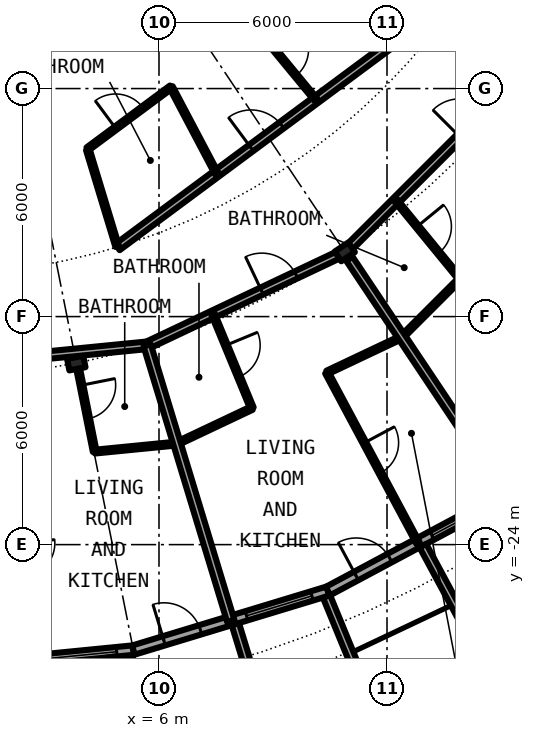
"""IFC4 building model, lengths in metres.
Left out: names, types, materials, properties, quantities, classifications, styles, units other than length and angle.
Written with IfcOpenShell. Run it as: python <this file> out.ifc"""

import sys

from ifc_helpers import new_model, si_unit, direction, frame, frame_2d, origin, origin_2d, place, context, subcontext, project, spatial, rectangle, i_section, extrude, element, fill, save


model = new_model("IFC4")
c1 = context("Model", 3, precision=1e-05, world=origin(), true_north=direction((0.0, 1.0)))
c2 = subcontext(c1, "Body", "Model", "MODEL_VIEW")
j1 = project(units=[si_unit("LENGTHUNIT", "METRE"), si_unit("PLANEANGLEUNIT", "RADIAN")], contexts=[c1])
p1 = place(None, origin())
s1 = spatial("IfcSite", under=j1, at=p1, CompositionType="ELEMENT")
p2 = place(p1, origin())
s2 = spatial("IfcBuilding", under=s1, at=p2, CompositionType="ELEMENT")
p3 = place(p2, frame((0.0, 0.0, 120.8)))
s3 = spatial("IfcBuildingStorey", under=s2, at=p3, CompositionType="ELEMENT", Elevation=120.8)
for number, where, z_axis, x_axis in (
    (1, (3.824, -19.223, 0.0), (0.0, 0.0, 1.0), (0.195, -0.981, 0.0)),
    (2, (10.889, -16.297, 0.0), (0.0, 0.0, 1.0), (0.556, -0.831, 0.0)),
):
    element("IfcColumn", number, at=place(p3, frame(where, z_axis=z_axis, x_axis=x_axis)), inside=s3, PredefinedType="COLUMN", context=c2, shape_type="SweptSolid", body=[
        extrude(i_section(OverallWidth=0.307, OverallDepth=0.432, WebThickness=0.021, FlangeThickness=0.04, FilletRadius=0.027, at=origin_2d()), origin(), (0.0, 0.0, 1.0), 3.05),
    ])
p4 = place(p3, frame((0.0, -27.3, 0.0), z_axis=(0.0, 0.0, 1.0), x_axis=(0.995173996315, 0.098126026407, 0.0)))
e3 = element("IfcWall", 3, at=p4, inside=s3, PredefinedType="SOLIDWALL", context=c2, shape_type="SweptSolid", body=[
    extrude(rectangle(XDim=5.352, YDim=0.25, at=frame_2d((2.676, 0.0))), origin(), (0.0, 0.0, 1.0), 2.7),
])
p5 = place(p4, frame((0.841, 0.0, 0.0)))
e4 = element("IfcOpeningElement", 4, at=p5, cuts=e3, PredefinedType="OPENING", context=c2, shape_type="SweptSolid", body=[
    extrude(rectangle(XDim=1.0, YDim=2.2, at=frame_2d((0.5, 1.1))), frame((0.0, 0.135, 0.0), z_axis=(0.0, -1.0, 0.0), x_axis=(1.0, 0.0, 0.0)), (0.0, 0.0, 1.0), 0.27),
])
p6 = place(p4, frame((3.111, 0.0, 0.3)))
e5 = element("IfcOpeningElement", 5, at=p6, cuts=e3, PredefinedType="OPENING", context=c2, shape_type="SweptSolid", body=[
    extrude(rectangle(XDim=1.8, YDim=2.1, at=frame_2d((0.9, 1.05))), frame((0.0, 0.135, 0.0), z_axis=(0.0, -1.0, 0.0), x_axis=(1.0, 0.0, 0.0)), (0.0, 0.0, 1.0), 0.27),
])
p7 = place(p3, frame((4.72, -26.961, -0.03), z_axis=(0.0, 0.0, 1.0), x_axis=(0.172463232037, -0.98501595601, 0.0)))
e6 = element("IfcWall", 6, at=p7, inside=s3, PredefinedType="SOLIDWALL", context=c2, shape_type="SweptSolid", body=[
    extrude(rectangle(XDim=2.929, YDim=0.2, at=frame_2d((1.464, 0.0))), origin(), (0.0, 0.0, 1.0), 2.73),
])
p8 = place(p3, frame((5.326, -26.775, 0.0), z_axis=(0.0, 0.0, 1.0), x_axis=(0.956965678721, 0.290201119486, 0.0)))
e7 = element("IfcWall", 7, at=p8, inside=s3, PredefinedType="SOLIDWALL", context=c2, shape_type="SweptSolid", body=[
    extrude(rectangle(XDim=5.351, YDim=0.25, at=frame_2d((2.676, 0.0))), origin(), (0.0, 0.0, 1.0), 2.7),
])
p9 = place(p8, frame((0.841, 0.0, 0.0)))
e8 = element("IfcOpeningElement", 8, at=p9, cuts=e7, PredefinedType="OPENING", context=c2, shape_type="SweptSolid", body=[
    extrude(rectangle(XDim=1.0, YDim=2.2, at=frame_2d((0.5, 1.1))), frame((0.0, 0.135, 0.0), z_axis=(0.0, -1.0, 0.0), x_axis=(1.0, 0.0, 0.0)), (0.0, 0.0, 1.0), 0.27),
])
p10 = place(p8, frame((3.111, 0.0, 0.3)))
e9 = element("IfcOpeningElement", 9, at=p10, cuts=e7, PredefinedType="OPENING", context=c2, shape_type="SweptSolid", body=[
    extrude(rectangle(XDim=1.8, YDim=2.1, at=frame_2d((0.9, 1.05))), frame((0.0, 0.135, 0.0), z_axis=(0.0, -1.0, 0.0), x_axis=(1.0, 0.0, 0.0)), (0.0, 0.0, 1.0), 0.27),
])
p11 = place(p3, frame((8.009, -26.092, -0.03), z_axis=(0.0, 0.0, 1.0), x_axis=(0.293406695073, -0.955987715029, 0.0)))
e10 = element("IfcWall", 10, at=p11, inside=s3, PredefinedType="SOLIDWALL", context=c2, shape_type="SweptSolid", body=[
    extrude(rectangle(XDim=3.006, YDim=0.2, at=frame_2d((1.503, 0.0))), origin(), (0.0, 0.0, 1.0), 2.73),
])
p12 = place(p3, frame((10.409, -25.364, -0.03), z_axis=(0.0, 0.0, 1.0), x_axis=(0.379509886562, -0.925187681501, 0.0)))
e11 = element("IfcWall", 11, at=p12, inside=s3, PredefinedType="SOLIDWALL", context=c2, shape_type="SweptSolid", body=[
    extrude(rectangle(XDim=2.883, YDim=0.2, at=frame_2d((1.441, 0.0))), origin(), (0.0, 0.0, 1.0), 2.73),
])
p13 = place(p3, frame((10.447, -25.222, 0.0), z_axis=(0.0, 0.0, 1.0), x_axis=(0.881915646801, 0.471407246368, 0.0)))
e12 = element("IfcWall", 12, at=p13, inside=s3, PredefinedType="SOLIDWALL", context=c2, shape_type="SweptSolid", body=[
    extrude(rectangle(XDim=5.352, YDim=0.25, at=frame_2d((2.676, 0.0))), origin(), (0.0, 0.0, 1.0), 2.7),
])
p14 = place(p13, frame((0.841, 0.0, 0.0)))
e13 = element("IfcOpeningElement", 13, at=p14, cuts=e12, PredefinedType="OPENING", context=c2, shape_type="SweptSolid", body=[
    extrude(rectangle(XDim=1.0, YDim=2.2, at=frame_2d((0.5, 1.1))), frame((0.0, 0.135, 0.0), z_axis=(0.0, -1.0, 0.0), x_axis=(1.0, 0.0, 0.0)), (0.0, 0.0, 1.0), 0.27),
])
p15 = place(p13, frame((3.111, 0.0, 0.3)))
e14 = element("IfcOpeningElement", 14, at=p15, cuts=e12, PredefinedType="OPENING", context=c2, shape_type="SweptSolid", body=[
    extrude(rectangle(XDim=1.8, YDim=2.1, at=frame_2d((0.9, 1.05))), frame((0.0, 0.135, 0.0), z_axis=(0.0, -1.0, 0.0), x_axis=(1.0, 0.0, 0.0)), (0.0, 0.0, 1.0), 0.27),
])
p16 = place(p3, frame((12.945, -24.029, -0.03), z_axis=(0.0, 0.0, 1.0), x_axis=(0.474424310775, -0.88029629861, 0.0)))
e15 = element("IfcWall", 15, at=p16, inside=s3, PredefinedType="SOLIDWALL", context=c2, shape_type="SweptSolid", body=[
    extrude(rectangle(XDim=3.006, YDim=0.2, at=frame_2d((1.503, 0.0))), origin(), (0.0, 0.0, 1.0), 2.73),
])
p17 = place(p3, frame((6.473, -21.34, 0.0), z_axis=(0.0, 0.0, 1.0), x_axis=(0.903929143338, 0.427682246328, 0.0)))
e16 = element("IfcWall", 16, at=p17, inside=s3, PredefinedType="PARTITIONING", context=c2, shape_type="SweptSolid", body=[
    extrude(rectangle(XDim=2.182, YDim=0.1, at=frame_2d((1.091, 0.0))), origin(), (0.0, 0.0, 1.0), 2.7),
])
p18 = place(p3, frame((10.425, -19.47, 0.0), z_axis=(0.0, 0.0, 1.0), x_axis=(0.903951937529, 0.427634066274, 0.0)))
e17 = element("IfcWall", 17, at=p18, inside=s3, PredefinedType="PARTITIONING", context=c2, shape_type="SweptSolid", body=[
    extrude(rectangle(XDim=2.181, YDim=0.1, at=frame_2d((1.091, 0.0))), origin(), (0.0, 0.0, 1.0), 2.7),
])
p19 = place(p3, frame((4.311, -21.553, 0.0), z_axis=(0.0, 0.0, 1.0), x_axis=(0.995195976339, 0.097902853268, 0.0)))
e18 = element("IfcWall", 18, at=p19, inside=s3, PredefinedType="PARTITIONING", context=c2, shape_type="SweptSolid", body=[
    extrude(rectangle(XDim=2.175, YDim=0.1, at=frame_2d((1.087, 0.0))), origin(), (0.0, 0.0, 1.0), 2.7),
])
p20 = place(p3, frame((12.389, -18.542, 0.0), z_axis=(0.0, 0.0, 1.0), x_axis=(0.707106781187, 0.707106781187, 0.0)))
e19 = element("IfcWall", 19, at=p20, inside=s3, PredefinedType="PARTITIONING", context=c2, shape_type="SweptSolid", body=[
    extrude(rectangle(XDim=2.175, YDim=0.1, at=frame_2d((1.088, 0.0))), origin(), (0.0, 0.0, 1.0), 2.7),
])
p21 = place(p3, frame((5.686, -18.758, 0.0), z_axis=(0.0, 0.0, 1.0), x_axis=(0.903961383505, 0.427614098379, 0.0)))
e20 = element("IfcWall", 20, at=p21, inside=s3, PredefinedType="PARTITIONING", context=c2, shape_type="SweptSolid", body=[
    extrude(rectangle(XDim=5.601, YDim=0.2, at=frame_2d((2.8, 0.0))), origin(), (0.0, 0.0, 1.0), 2.39),
])
p22 = place(p21, frame((3.339, 0.0, 0.0)))
e21 = element("IfcOpeningElement", 21, at=p22, cuts=e20, PredefinedType="OPENING", context=c2, shape_type="SweptSolid", body=[
    extrude(rectangle(XDim=1.0, YDim=2.3, at=frame_2d((0.5, 1.15))), frame((0.0, 0.11, 0.0), z_axis=(0.0, -1.0, 0.0), x_axis=(1.0, 0.0, 0.0)), (0.0, 0.0, 1.0), 0.22),
])
p23 = place(p3, frame((-1.921, -19.506, 0.0), z_axis=(0.0, 0.0, 1.0), x_axis=(0.995172982325, 0.098136309541, 0.0)))
e22 = element("IfcWall", 22, at=p23, inside=s3, PredefinedType="PARTITIONING", context=c2, shape_type="SweptSolid", body=[
    extrude(rectangle(XDim=7.655, YDim=0.2, at=frame_2d((3.827, 0.0))), origin(), (0.0, 0.0, 1.0), 2.39),
])
p24 = place(p23, frame((2.368, 0.0, 0.0)))
e23 = element("IfcOpeningElement", 23, at=p24, cuts=e22, PredefinedType="OPENING", context=c2, shape_type="SweptSolid", body=[
    extrude(rectangle(XDim=1.0, YDim=2.3, at=frame_2d((0.5, 1.15))), frame((0.0, 0.11, 0.0), z_axis=(0.0, -1.0, 0.0), x_axis=(1.0, 0.0, 0.0)), (0.0, 0.0, 1.0), 0.22),
])
p25 = place(p3, frame((11.0, -16.186, 0.0), z_axis=(0.0, 0.0, 1.0), x_axis=(0.707106781187, 0.707106781187, 0.0)))
e24 = element("IfcWall", 24, at=p25, inside=s3, PredefinedType="PARTITIONING", context=c2, shape_type="SweptSolid", body=[
    extrude(rectangle(XDim=7.334, YDim=0.2, at=frame_2d((3.667, 0.0))), origin(), (0.0, 0.0, 1.0), 2.39),
])
p26 = place(p25, frame((4.123, 0.0, 0.0)))
e25 = element("IfcOpeningElement", 25, at=p26, cuts=e24, PredefinedType="OPENING", context=c2, shape_type="SweptSolid", body=[
    extrude(rectangle(XDim=1.0, YDim=2.3, at=frame_2d((0.5, 1.15))), frame((0.0, 0.11, 0.0), z_axis=(0.0, -1.0, 0.0), x_axis=(1.0, 0.0, 0.0)), (0.0, 0.0, 1.0), 0.22),
])
p27 = place(p3, frame((4.906, -16.172, 0.0), z_axis=(0.0, 0.0, 1.0), x_axis=(0.803204584823, 0.59570327758, 0.0)))
e26 = element("IfcWall", 26, at=p27, inside=s3, PredefinedType="PARTITIONING", context=c2, shape_type="SweptSolid", body=[
    extrude(rectangle(XDim=11.387, YDim=0.2, at=frame_2d((5.693, 0.0))), origin(), (0.0, 0.0, 1.0), 2.7),
])
p28 = place(p27, frame((4.38, 0.0, 0.0)))
e27 = element("IfcOpeningElement", 27, at=p28, cuts=e26, PredefinedType="OPENING", context=c2, shape_type="SweptSolid", body=[
    extrude(rectangle(XDim=1.0, YDim=2.3, at=frame_2d((0.5, 1.15))), frame((0.0, 0.11, 0.0), z_axis=(0.0, -1.0, 0.0), x_axis=(1.0, 0.0, 0.0)), (0.0, 0.0, 1.0), 0.22),
])
p29 = place(p3, frame((4.122, -13.589, 0.0), z_axis=(0.0, 0.0, 1.0), x_axis=(0.803128348509, 0.595806055542, 0.0)))
e28 = element("IfcWall", 28, at=p29, inside=s3, PredefinedType="PARTITIONING", context=c2, shape_type="SweptSolid", body=[
    extrude(rectangle(XDim=2.734, YDim=0.1, at=frame_2d((1.367, 0.0))), origin(), (0.0, 0.0, 1.0), 2.7),
])
p30 = place(p29, frame((0.917, 0.0, 0.0)))
e29 = element("IfcOpeningElement", 29, at=p30, cuts=e28, PredefinedType="OPENING", context=c2, shape_type="SweptSolid", body=[
    extrude(rectangle(XDim=0.9, YDim=2.3, at=frame_2d((0.45, 1.15))), frame((0.0, 0.06, 0.0), z_axis=(0.0, -1.0, 0.0), x_axis=(1.0, 0.0, 0.0)), (0.0, 0.0, 1.0), 0.12),
])
p31 = place(p3, frame((3.885, -19.432, 0.0), z_axis=(0.0, 0.0, 1.0), x_axis=(0.196051018784, -0.980593696713, 0.0)))
e30 = element("IfcWall", 30, at=p31, inside=s3, PredefinedType="PARTITIONING", context=c2, shape_type="SweptSolid", body=[
    extrude(rectangle(XDim=2.163, YDim=0.1, at=frame_2d((1.082, 0.0))), origin(), (0.0, 0.0, 1.0), 2.7),
])
p32 = place(p31, frame((0.382, 0.0, 0.0)))
e31 = element("IfcOpeningElement", 31, at=p32, cuts=e30, PredefinedType="OPENING", context=c2, shape_type="SweptSolid", body=[
    extrude(rectangle(XDim=0.9, YDim=2.3, at=frame_2d((0.45, 1.15))), frame((0.0, 0.06, 0.0), z_axis=(0.0, -1.0, 0.0), x_axis=(1.0, 0.0, 0.0)), (0.0, 0.0, 1.0), 0.12),
])
p33 = place(p3, frame((4.908, -5.959, 0.0), z_axis=(0.0, 0.0, 1.0), x_axis=(0.636105207978, -0.771602335652, 0.0)))
e32 = element("IfcWall", 32, at=p33, inside=s3, PredefinedType="PARTITIONING", context=c2, shape_type="SweptSolid", body=[
    extrude(rectangle(XDim=8.213, YDim=0.1, at=frame_2d((4.106, 0.0))), origin(), (0.0, 0.0, 1.0), 2.7),
])
p34 = place(p33, frame((6.49, 0.0, 0.0)))
e33 = element("IfcOpeningElement", 33, at=p34, cuts=e32, PredefinedType="OPENING", context=c2, shape_type="SweptSolid", body=[
    extrude(rectangle(XDim=0.9, YDim=2.3, at=frame_2d((0.45, 1.15))), frame((0.0, 0.06, 0.0), z_axis=(0.0, -1.0, 0.0), x_axis=(1.0, 0.0, 0.0)), (0.0, 0.0, 1.0), 0.12),
])
p35 = place(p33, frame((2.384, 0.0, 0.0)))
e34 = element("IfcOpeningElement", 34, at=p35, cuts=e32, PredefinedType="OPENING", context=c2, shape_type="SweptSolid", body=[
    extrude(rectangle(XDim=0.9, YDim=2.3, at=frame_2d((0.45, 1.15))), frame((0.0, 0.06, 0.0), z_axis=(0.0, -1.0, 0.0), x_axis=(1.0, 0.0, 0.0)), (0.0, 0.0, 1.0), 0.12),
])
p36 = place(p3, frame((5.689, -18.756, 0.0), z_axis=(0.0, 0.0, 1.0), x_axis=(0.290294523619, -0.956937348815, 0.0)))
e35 = element("IfcWall", 35, at=p36, inside=s3, PredefinedType="PARTITIONING", context=c2, shape_type="SweptSolid", body=[
    extrude(rectangle(XDim=7.575, YDim=0.2, at=frame_2d((3.788, 0.0))), origin(), (0.0, 0.0, 1.0), 2.7),
])
p37 = place(p3, frame((6.316, -11.961, 0.0), z_axis=(0.0, 0.0, 1.0), x_axis=(0.467037016128, -0.884237765291, 0.0)))
e36 = element("IfcWall", 36, at=p37, inside=s3, PredefinedType="PARTITIONING", context=c2, shape_type="SweptSolid", body=[
    extrude(rectangle(XDim=2.572, YDim=0.1, at=frame_2d((1.286, 0.0))), origin(), (0.0, 0.0, 1.0), 2.7),
])
p38 = place(p3, frame((7.423, -17.936, 0.0), z_axis=(0.0, 0.0, 1.0), x_axis=(0.382195876364, -0.924081334132, 0.0)))
e37 = element("IfcWall", 37, at=p38, inside=s3, PredefinedType="PARTITIONING", context=c2, shape_type="SweptSolid", body=[
    extrude(rectangle(XDim=2.674, YDim=0.1, at=frame_2d((1.337, 0.0))), origin(), (0.0, 0.0, 1.0), 2.7),
])
p39 = place(p38, frame((0.887, 0.0, 0.0)))
e38 = element("IfcOpeningElement", 38, at=p39, cuts=e37, PredefinedType="OPENING", context=c2, shape_type="SweptSolid", body=[
    extrude(rectangle(XDim=0.9, YDim=2.3, at=frame_2d((0.45, 1.15))), frame((0.0, 0.06, 0.0), z_axis=(0.0, -1.0, 0.0), x_axis=(1.0, 0.0, 0.0)), (0.0, 0.0, 1.0), 0.12),
])
p40 = place(p3, frame((10.417, -19.474, 0.0), z_axis=(0.0, 0.0, 1.0), x_axis=(0.471755462896, -0.881729427448, 0.0)))
e39 = element("IfcWall", 39, at=p40, inside=s3, PredefinedType="PARTITIONING", context=c2, shape_type="SweptSolid", body=[
    extrude(rectangle(XDim=5.09, YDim=0.1, at=frame_2d((2.545, 0.0))), origin(), (0.0, 0.0, 1.0), 2.7),
])
p41 = place(p40, frame((2.095, 0.0, 0.0)))
e40 = element("IfcOpeningElement", 40, at=p41, cuts=e39, PredefinedType="OPENING", context=c2, shape_type="SweptSolid", body=[
    extrude(rectangle(XDim=0.9, YDim=2.3, at=frame_2d((0.45, 1.15))), frame((0.0, 0.06, 0.0), z_axis=(0.0, -1.0, 0.0), x_axis=(1.0, 0.0, 0.0)), (0.0, 0.0, 1.0), 0.12),
])
p42 = place(p3, frame((11.009, -16.477, 0.0), z_axis=(0.0, 0.0, 1.0), x_axis=(0.555664536482, -0.831406593008, 0.0)))
e41 = element("IfcWall", 41, at=p42, inside=s3, PredefinedType="PARTITIONING", context=c2, shape_type="SweptSolid", body=[
    extrude(rectangle(XDim=7.358, YDim=0.2, at=frame_2d((3.679, 0.0))), origin(), (0.0, 0.0, 1.0), 2.7),
])
p43 = place(p3, frame((12.237, -14.948, 0.0), z_axis=(0.0, 0.0, 1.0), x_axis=(0.633537478353, -0.773712002958, 0.0)))
e42 = element("IfcWall", 42, at=p43, inside=s3, PredefinedType="PARTITIONING", context=c2, shape_type="SweptSolid", body=[
    extrude(rectangle(XDim=2.661, YDim=0.1, at=frame_2d((1.331, 0.0))), origin(), (0.0, 0.0, 1.0), 2.7),
])
p44 = place(p43, frame((0.881, 0.0, 0.0)))
e43 = element("IfcOpeningElement", 43, at=p44, cuts=e42, PredefinedType="OPENING", context=c2, shape_type="SweptSolid", body=[
    extrude(rectangle(XDim=0.9, YDim=2.3, at=frame_2d((0.45, 1.15))), frame((0.0, 0.06, 0.0), z_axis=(0.0, -1.0, 0.0), x_axis=(1.0, 0.0, 0.0)), (0.0, 0.0, 1.0), 0.12),
])
p45 = place(p3, frame((4.9, -16.152, 0.0), z_axis=(0.0, 0.0, 1.0), x_axis=(-0.290456070925, 0.956888327269, 0.0)))
e44 = element("IfcWall", 44, at=p45, inside=s3, PredefinedType="PARTITIONING", context=c2, shape_type="SweptSolid", body=[
    extrude(rectangle(XDim=2.658, YDim=0.1, at=frame_2d((1.329, 0.0))), origin(), (0.0, 0.0, 1.0), 2.7),
])
p46 = place(p6, origin())
e45 = element("IfcWindow", 45, at=p46, inside=s3, PartitioningType="SINGLE_PANEL", PredefinedType="WINDOW", context=c2, shape_type="SweptSolid", body=[
    extrude(rectangle(XDim=1.8, YDim=2.1, at=frame_2d((0.9, 1.05))), frame((0.0, 0.03, 0.0), z_axis=(0.0, -1.0, 0.0), x_axis=(1.0, 0.0, 0.0)), (0.0, 0.0, 1.0), 0.06),
])
fill(e5, e45)
p47 = place(p9, origin())
e46 = element("IfcDoor", 46, at=p47, inside=s3, OperationType="SINGLE_SWING_LEFT", PredefinedType="DOOR", context=c2, shape_type="SweptSolid", body=[
    extrude(rectangle(XDim=1.0, YDim=2.2, at=frame_2d((0.5, 1.1))), frame((0.0, 0.025, 0.0), z_axis=(0.0, -1.0, 0.0), x_axis=(1.0, 0.0, 0.0)), (0.0, 0.0, 1.0), 0.05),
])
fill(e8, e46)
p48 = place(p10, origin())
e47 = element("IfcWindow", 47, at=p48, inside=s3, PartitioningType="SINGLE_PANEL", PredefinedType="WINDOW", context=c2, shape_type="SweptSolid", body=[
    extrude(rectangle(XDim=1.8, YDim=2.1, at=frame_2d((0.9, 1.05))), frame((0.0, 0.03, 0.0), z_axis=(0.0, -1.0, 0.0), x_axis=(1.0, 0.0, 0.0)), (0.0, 0.0, 1.0), 0.06),
])
fill(e9, e47)
p49 = place(p14, origin())
e48 = element("IfcDoor", 48, at=p49, inside=s3, OperationType="SINGLE_SWING_LEFT", PredefinedType="DOOR", context=c2, shape_type="SweptSolid", body=[
    extrude(rectangle(XDim=1.0, YDim=2.2, at=frame_2d((0.5, 1.1))), frame((0.0, 0.025, 0.0), z_axis=(0.0, -1.0, 0.0), x_axis=(1.0, 0.0, 0.0)), (0.0, 0.0, 1.0), 0.05),
])
fill(e13, e48)
p50 = place(p15, origin())
e49 = element("IfcWindow", 49, at=p50, inside=s3, PartitioningType="SINGLE_PANEL", PredefinedType="WINDOW", context=c2, shape_type="SweptSolid", body=[
    extrude(rectangle(XDim=1.8, YDim=2.1, at=frame_2d((0.9, 1.05))), frame((0.0, 0.03, 0.0), z_axis=(0.0, -1.0, 0.0), x_axis=(1.0, 0.0, 0.0)), (0.0, 0.0, 1.0), 0.06),
])
fill(e14, e49)
p51 = place(p32, origin())
e50 = element("IfcDoor", 50, at=p51, inside=s3, OperationType="SINGLE_SWING_LEFT", PredefinedType="DOOR", context=c2, shape_type="SweptSolid", body=[
    extrude(rectangle(XDim=0.9, YDim=2.3, at=frame_2d((0.45, 1.15))), frame((0.0, 0.025, 0.0), z_axis=(0.0, -1.0, 0.0), x_axis=(1.0, 0.0, 0.0)), (0.0, 0.0, 1.0), 0.05),
])
fill(e31, e50)
p52 = place(p22, origin())
e51 = element("IfcDoor", 51, at=p52, inside=s3, OperationType="SINGLE_SWING_RIGHT", PredefinedType="DOOR", context=c2, shape_type="SweptSolid", body=[
    extrude(rectangle(XDim=1.0, YDim=2.3, at=frame_2d((0.5, 1.15))), frame((0.0, 0.025, 0.0), z_axis=(0.0, -1.0, 0.0), x_axis=(1.0, 0.0, 0.0)), (0.0, 0.0, 1.0), 0.05),
])
fill(e21, e51)
p53 = place(p39, origin())
e52 = element("IfcDoor", 52, at=p53, inside=s3, OperationType="SINGLE_SWING_RIGHT", PredefinedType="DOOR", context=c2, shape_type="SweptSolid", body=[
    extrude(rectangle(XDim=0.9, YDim=2.3, at=frame_2d((0.45, 1.15))), frame((0.0, 0.025, 0.0), z_axis=(0.0, -1.0, 0.0), x_axis=(1.0, 0.0, 0.0)), (0.0, 0.0, 1.0), 0.05),
])
fill(e38, e52)
p54 = place(p41, origin())
e53 = element("IfcDoor", 53, at=p54, inside=s3, OperationType="SINGLE_SWING_LEFT", PredefinedType="DOOR", context=c2, shape_type="SweptSolid", body=[
    extrude(rectangle(XDim=0.9, YDim=2.3, at=frame_2d((0.45, 1.15))), frame((0.0, 0.025, 0.0), z_axis=(0.0, -1.0, 0.0), x_axis=(1.0, 0.0, 0.0)), (0.0, 0.0, 1.0), 0.05),
])
fill(e40, e53)
p55 = place(p44, origin())
e54 = element("IfcDoor", 54, at=p55, inside=s3, OperationType="SINGLE_SWING_RIGHT", PredefinedType="DOOR", context=c2, shape_type="SweptSolid", body=[
    extrude(rectangle(XDim=0.9, YDim=2.3, at=frame_2d((0.45, 1.15))), frame((0.0, 0.025, 0.0), z_axis=(0.0, -1.0, 0.0), x_axis=(1.0, 0.0, 0.0)), (0.0, 0.0, 1.0), 0.05),
])
fill(e43, e54)
p56 = place(p28, origin())
e55 = element("IfcDoor", 55, at=p56, inside=s3, OperationType="SINGLE_SWING_LEFT", PredefinedType="DOOR", context=c2, shape_type="SweptSolid", body=[
    extrude(rectangle(XDim=1.0, YDim=2.3, at=frame_2d((0.5, 1.15))), frame((0.0, 0.025, 0.0), z_axis=(0.0, -1.0, 0.0), x_axis=(1.0, 0.0, 0.0)), (0.0, 0.0, 1.0), 0.05),
])
fill(e27, e55)
p57 = place(p30, origin())
e56 = element("IfcDoor", 56, at=p57, inside=s3, OperationType="SINGLE_SWING_RIGHT", PredefinedType="DOOR", context=c2, shape_type="SweptSolid", body=[
    extrude(rectangle(XDim=0.9, YDim=2.3, at=frame_2d((0.45, 1.15))), frame((0.0, 0.025, 0.0), z_axis=(0.0, -1.0, 0.0), x_axis=(1.0, 0.0, 0.0)), (0.0, 0.0, 1.0), 0.05),
])
fill(e29, e56)
p58 = place(p34, origin())
e57 = element("IfcDoor", 57, at=p58, inside=s3, OperationType="SINGLE_SWING_RIGHT", PredefinedType="DOOR", context=c2, shape_type="SweptSolid", body=[
    extrude(rectangle(XDim=0.9, YDim=2.3, at=frame_2d((0.45, 1.15))), frame((0.0, 0.025, 0.0), z_axis=(0.0, -1.0, 0.0), x_axis=(1.0, 0.0, 0.0)), (0.0, 0.0, 1.0), 0.05),
])
fill(e33, e57)
save(model, sys.argv[1])
